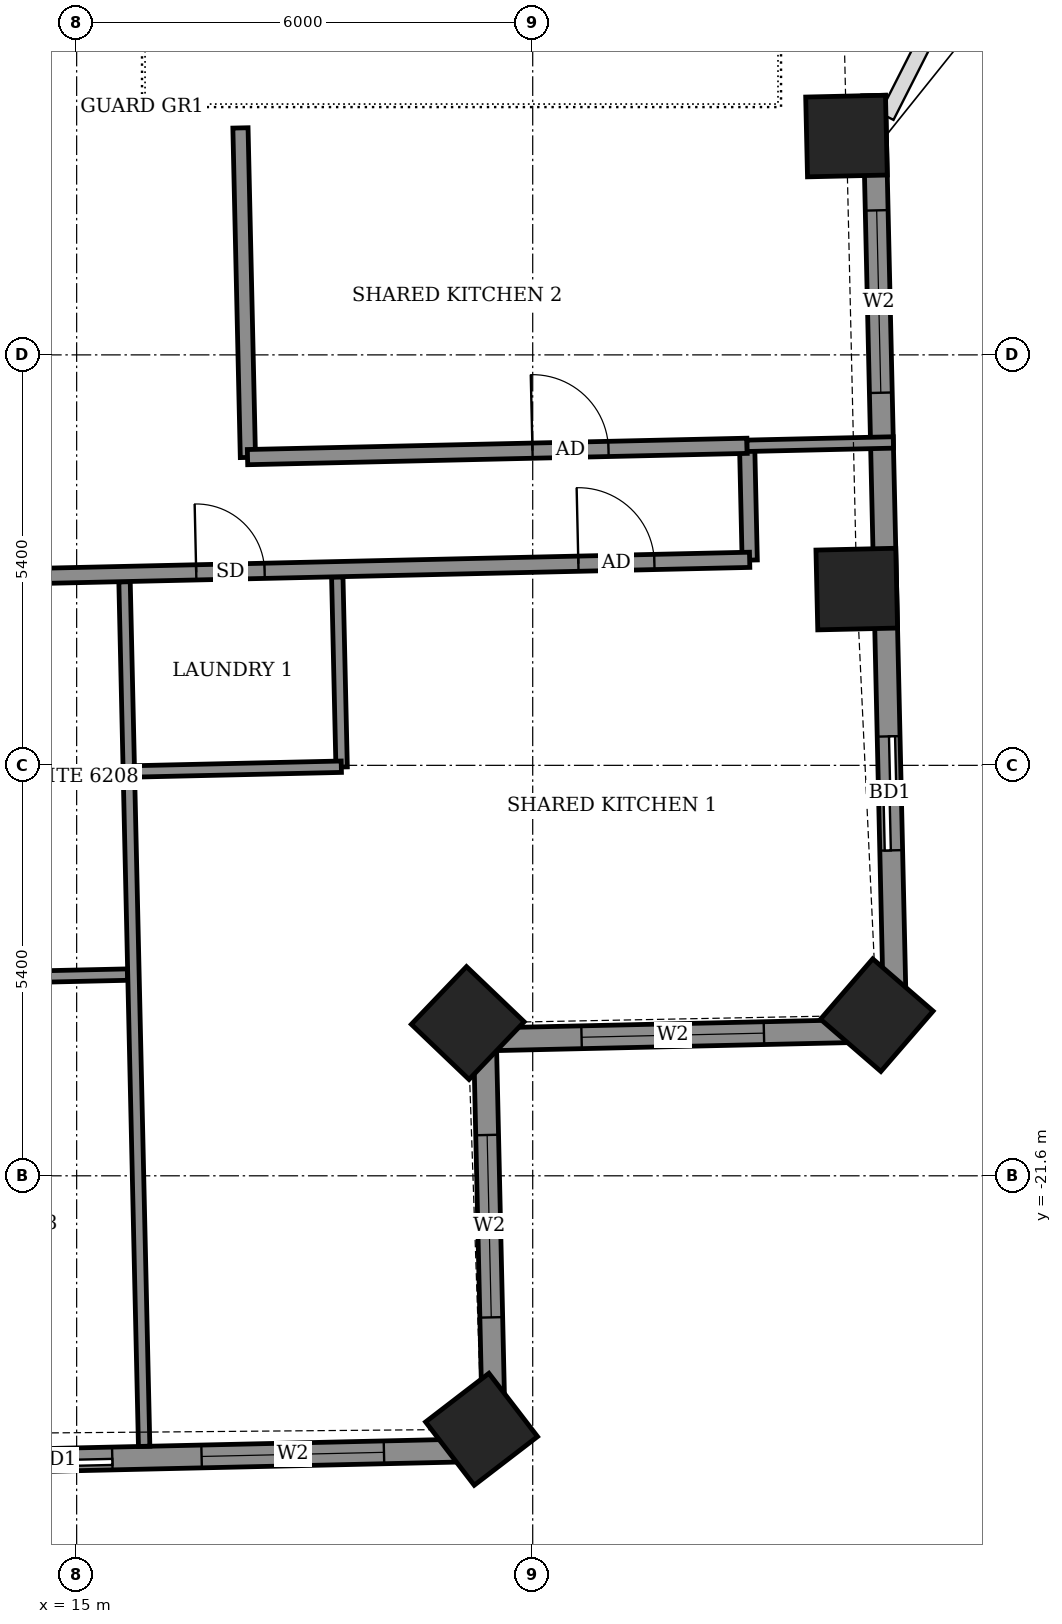
"""IFC4 building model, lengths in metres.
Left out: names, types, materials, properties, quantities, classifications, styles, units other than length and angle.
Written with IfcOpenShell. Run it as: python <this file> out.ifc"""

import sys

from ifc_helpers import new_model, si_unit, direction, frame, frame_2d, origin, origin_2d, place, context, subcontext, project, spatial, rectangle, extrude, element, fill, save


model = new_model("IFC4")
c1 = context("Model", 3, precision=1e-05, world=origin(), true_north=direction((0.0, 1.0)))
c2 = subcontext(c1, "Body", "Model", "MODEL_VIEW")
j1 = project(units=[si_unit("LENGTHUNIT", "METRE"), si_unit("PLANEANGLEUNIT", "RADIAN")], contexts=[c1])
p1 = place(None, origin())
s1 = spatial("IfcSite", under=j1, at=p1, CompositionType="ELEMENT")
p2 = place(p1, origin())
s2 = spatial("IfcBuilding", under=s1, at=p2, CompositionType="ELEMENT")
p3 = place(p2, frame((0.0, 0.0, 245.5)))
s3 = spatial("IfcBuildingStorey", under=s2, at=p3, CompositionType="ELEMENT", Elevation=245.5)
for number, where, z_axis, x_axis in (
    (1, (20.327, -24.935, -0.55), (0.0, 0.0, 1.0), (0.793, 0.609, 0.0)),
    (2, (20.146, -19.59, -0.55), (0.0, 0.0, 1.0), (0.691, 0.723, 0.0)),
    (3, (25.527, -19.487, -0.55), (0.0, 0.0, 1.0), (0.654, 0.756, 0.0)),
    (4, (25.263, -13.881, -0.55), (0.0, 0.0, 1.0), (-0.023, 1.0, 0.0)),
    (5, (25.128, -7.921, -0.55), (0.0, 0.0, 1.0), (-0.023, 1.0, 0.0)),
):
    element("IfcColumn", number, at=place(p3, frame(where, z_axis=z_axis, x_axis=x_axis)), inside=s3, PredefinedType="COLUMN", context=c2, shape_type="SweptSolid", body=[
        extrude(rectangle(XDim=1.05, YDim=1.05, at=origin_2d()), origin(), (0.0, 0.0, 1.0), 3.6),
    ])
p4 = place(p3, frame((25.77, -19.684, 0.0), z_axis=(0.0, 0.0, 1.0), x_axis=(-0.022688489476, 0.999742583091, 0.0)))
e6 = element("IfcWall", 6, at=p4, inside=s3, PredefinedType="SOLIDWALL", context=c2, shape_type="SweptSolid", body=[
    extrude(rectangle(XDim=12.299, YDim=0.3, at=frame_2d((6.15, 0.0))), origin(), (0.0, 0.0, 1.0), 2.55),
])
p5 = place(p4, frame((2.366, 0.0, 0.0)))
e7 = element("IfcOpeningElement", 7, at=p5, cuts=e6, PredefinedType="OPENING", context=c2, shape_type="SweptSolid", body=[
    extrude(rectangle(XDim=1.5, YDim=2.4, at=frame_2d((0.75, 1.2))), frame((0.0, 0.16, 0.0), z_axis=(0.0, -1.0, 0.0), x_axis=(1.0, 0.0, 0.0)), (0.0, 0.0, 1.0), 0.32),
])
p6 = place(p4, frame((8.388, 0.0, 0.9)))
e8 = element("IfcOpeningElement", 8, at=p6, cuts=e6, PredefinedType="OPENING", context=c2, shape_type="SweptSolid", body=[
    extrude(rectangle(XDim=2.4, YDim=1.5, at=frame_2d((1.2, 0.75))), frame((0.0, 0.16, 0.0), z_axis=(0.0, -1.0, 0.0), x_axis=(1.0, 0.0, 0.0)), (0.0, 0.0, 1.0), 0.32),
])
p7 = place(p3, frame((-23.403, -26.201, 0.0), z_axis=(0.0, 0.0, 1.0), x_axis=(0.999742770494, 0.022680230258, 0.0)))
e9 = element("IfcWall", 9, at=p7, inside=s3, PredefinedType="SOLIDWALL", context=c2, shape_type="SweptSolid", body=[
    extrude(rectangle(XDim=43.908, YDim=0.3, at=frame_2d((21.954, 0.0))), origin(), (0.0, 0.0, 1.0), 2.55),
])
p8 = place(p7, frame((1.951, 0.0, 0.0)))
e10 = element("IfcOpeningElement", 10, at=p8, cuts=e9, PredefinedType="OPENING", context=c2, shape_type="SweptSolid", body=[
    extrude(rectangle(XDim=1.5, YDim=2.4, at=frame_2d((0.75, 1.2))), frame((0.0, 0.16, 0.0), z_axis=(0.0, -1.0, 0.0), x_axis=(1.0, 0.0, 0.0)), (0.0, 0.0, 1.0), 0.32),
])
p9 = place(p7, frame((5.272, 0.0, 0.0)))
e11 = element("IfcOpeningElement", 11, at=p9, cuts=e9, PredefinedType="OPENING", context=c2, shape_type="SweptSolid", body=[
    extrude(rectangle(XDim=1.2, YDim=2.4, at=frame_2d((0.6, 1.2))), frame((0.0, 0.16, 0.0), z_axis=(0.0, -1.0, 0.0), x_axis=(1.0, 0.0, 0.0)), (0.0, 0.0, 1.0), 0.32),
])
p10 = place(p7, frame((10.475, 0.0, 0.0)))
e12 = element("IfcOpeningElement", 12, at=p10, cuts=e9, PredefinedType="OPENING", context=c2, shape_type="SweptSolid", body=[
    extrude(rectangle(XDim=1.5, YDim=2.4, at=frame_2d((0.75, 1.2))), frame((0.0, 0.16, 0.0), z_axis=(0.0, -1.0, 0.0), x_axis=(1.0, 0.0, 0.0)), (0.0, 0.0, 1.0), 0.32),
])
p11 = place(p7, frame((15.53, 0.0, 0.0)))
e13 = element("IfcOpeningElement", 13, at=p11, cuts=e9, PredefinedType="OPENING", context=c2, shape_type="SweptSolid", body=[
    extrude(rectangle(XDim=1.5, YDim=2.4, at=frame_2d((0.75, 1.2))), frame((0.0, 0.16, 0.0), z_axis=(0.0, -1.0, 0.0), x_axis=(1.0, 0.0, 0.0)), (0.0, 0.0, 1.0), 0.32),
])
p12 = place(p7, frame((18.939, 0.0, 0.0)))
e14 = element("IfcOpeningElement", 14, at=p12, cuts=e9, PredefinedType="OPENING", context=c2, shape_type="SweptSolid", body=[
    extrude(rectangle(XDim=1.5, YDim=2.4, at=frame_2d((0.75, 1.2))), frame((0.0, 0.16, 0.0), z_axis=(0.0, -1.0, 0.0), x_axis=(1.0, 0.0, 0.0)), (0.0, 0.0, 1.0), 0.32),
])
p13 = place(p7, frame((23.489, 0.0, 0.0)))
e15 = element("IfcOpeningElement", 15, at=p13, cuts=e9, PredefinedType="OPENING", context=c2, shape_type="SweptSolid", body=[
    extrude(rectangle(XDim=1.5, YDim=2.4, at=frame_2d((0.75, 1.2))), frame((0.0, 0.16, 0.0), z_axis=(0.0, -1.0, 0.0), x_axis=(1.0, 0.0, 0.0)), (0.0, 0.0, 1.0), 0.32),
])
p14 = place(p7, frame((26.898, 0.0, 0.0)))
e16 = element("IfcOpeningElement", 16, at=p14, cuts=e9, PredefinedType="OPENING", context=c2, shape_type="SweptSolid", body=[
    extrude(rectangle(XDim=1.5, YDim=2.4, at=frame_2d((0.75, 1.2))), frame((0.0, 0.16, 0.0), z_axis=(0.0, -1.0, 0.0), x_axis=(1.0, 0.0, 0.0)), (0.0, 0.0, 1.0), 0.32),
])
p15 = place(p7, frame((32.05, 0.0, 0.0)))
e17 = element("IfcOpeningElement", 17, at=p15, cuts=e9, PredefinedType="OPENING", context=c2, shape_type="SweptSolid", body=[
    extrude(rectangle(XDim=1.5, YDim=2.4, at=frame_2d((0.75, 1.2))), frame((0.0, 0.16, 0.0), z_axis=(0.0, -1.0, 0.0), x_axis=(1.0, 0.0, 0.0)), (0.0, 0.0, 1.0), 0.32),
])
p16 = place(p7, frame((37.382, 0.0, 0.0)))
e18 = element("IfcOpeningElement", 18, at=p16, cuts=e9, PredefinedType="OPENING", context=c2, shape_type="SweptSolid", body=[
    extrude(rectangle(XDim=1.5, YDim=2.4, at=frame_2d((0.75, 1.2))), frame((0.0, 0.16, 0.0), z_axis=(0.0, -1.0, 0.0), x_axis=(1.0, 0.0, 0.0)), (0.0, 0.0, 1.0), 0.32),
])
p17 = place(p7, frame((40.057, 0.0, 0.9)))
e19 = element("IfcOpeningElement", 19, at=p17, cuts=e9, PredefinedType="OPENING", context=c2, shape_type="SweptSolid", body=[
    extrude(rectangle(XDim=2.4, YDim=1.5, at=frame_2d((1.2, 0.75))), frame((0.0, 0.16, 0.0), z_axis=(0.0, -1.0, 0.0), x_axis=(1.0, 0.0, 0.0)), (0.0, 0.0, 1.0), 0.32),
])
p18 = place(p3, frame((20.494, -25.205, 0.0), z_axis=(0.0, 0.0, 1.0), x_axis=(-0.022558128916, 0.999745533033, 0.0)))
e20 = element("IfcWall", 20, at=p18, inside=s3, PredefinedType="SOLIDWALL", context=c2, shape_type="SweptSolid", body=[
    extrude(rectangle(XDim=5.401, YDim=0.3, at=frame_2d((2.7, 0.0))), origin(), (0.0, 0.0, 1.0), 2.55),
])
p19 = place(p18, frame((1.743, 0.0, 0.9)))
e21 = element("IfcOpeningElement", 21, at=p19, cuts=e20, PredefinedType="OPENING", context=c2, shape_type="SweptSolid", body=[
    extrude(rectangle(XDim=2.4, YDim=1.5, at=frame_2d((1.2, 0.75))), frame((0.0, 0.16, 0.0), z_axis=(0.0, -1.0, 0.0), x_axis=(1.0, 0.0, 0.0)), (0.0, 0.0, 1.0), 0.32),
])
p20 = place(p3, frame((20.372, -19.806, 0.0), z_axis=(0.0, 0.0, 1.0), x_axis=(0.999745417973, 0.02256322766, 0.0)))
e22 = element("IfcWall", 22, at=p20, inside=s3, PredefinedType="SOLIDWALL", context=c2, shape_type="SweptSolid", body=[
    extrude(rectangle(XDim=5.399, YDim=0.3, at=frame_2d((2.7, 0.0))), origin(), (0.0, 0.0, 1.0), 2.55),
])
p21 = place(p20, frame((1.271, 0.0, 0.9)))
e23 = element("IfcOpeningElement", 23, at=p21, cuts=e22, PredefinedType="OPENING", context=c2, shape_type="SweptSolid", body=[
    extrude(rectangle(XDim=2.4, YDim=1.5, at=frame_2d((1.2, 0.75))), frame((0.0, 0.16, 0.0), z_axis=(0.0, -1.0, 0.0), x_axis=(1.0, 0.0, 0.0)), (0.0, 0.0, 1.0), 0.32),
])
p22 = place(p3, frame((15.888, -25.159, 0.0), z_axis=(0.0, 0.0, 1.0), x_axis=(-0.022684355347, 0.999742676904, 0.0)))
e24 = element("IfcWall", 24, at=p22, inside=s3, PredefinedType="PARTITIONING", context=c2, shape_type="SweptSolid", body=[
    extrude(rectangle(XDim=11.376, YDim=0.15, at=frame_2d((5.688, 0.0))), origin(), (0.0, 0.0, 1.0), 2.55),
])
p23 = place(p3, frame((13.344, -19.005, 0.0), z_axis=(0.0, 0.0, 1.0), x_axis=(0.999749744571, 0.022370700241, 0.0)))
e25 = element("IfcWall", 25, at=p23, inside=s3, PredefinedType="PARTITIONING", context=c2, shape_type="SweptSolid", body=[
    extrude(rectangle(XDim=2.324, YDim=0.15, at=frame_2d((1.162, 0.0))), origin(), (0.0, 0.0, 1.0), 3.05),
])
p24 = place(p3, frame((18.486, -16.222, 0.0), z_axis=(0.0, 0.0, 1.0), x_axis=(-0.022854521249, 0.999738801317, 0.0)))
e26 = element("IfcWall", 26, at=p24, inside=s3, PredefinedType="PARTITIONING", context=c2, shape_type="SweptSolid", body=[
    extrude(rectangle(XDim=2.5, YDim=0.15, at=frame_2d((1.25, 0.0))), origin(), (0.0, 0.0, 1.0), 3.05),
])
p25 = place(p3, frame((15.757, -16.28, 0.0), z_axis=(0.0, 0.0, 1.0), x_axis=(0.99974114142, 0.022751926344, 0.0)))
e27 = element("IfcWall", 27, at=p25, inside=s3, PredefinedType="PARTITIONING", context=c2, shape_type="SweptSolid", body=[
    extrude(rectangle(XDim=2.726, YDim=0.15, at=frame_2d((1.363, 0.0))), origin(), (0.0, 0.0, 1.0), 3.05),
])
p26 = place(p3, frame((23.855, -13.5, 0.0), z_axis=(0.0, 0.0, 1.0), x_axis=(-0.022617910375, 0.999744182344, 0.0)))
e28 = element("IfcWall", 28, at=p26, inside=s3, PredefinedType="PARTITIONING", context=c2, shape_type="SweptSolid", body=[
    extrude(rectangle(XDim=1.5, YDim=0.2, at=frame_2d((0.75, 0.0))), origin(), (0.0, 0.0, 1.0), 3.05),
])
p27 = place(p3, frame((-27.016, -14.65, 0.0), z_axis=(0.0, 0.0, 1.0), x_axis=(0.999742874861, 0.022675629315, 0.0)))
e29 = element("IfcWall", 29, at=p27, inside=s3, PredefinedType="PARTITIONING", context=c2, shape_type="SweptSolid", body=[
    extrude(rectangle(XDim=50.883, YDim=0.2, at=frame_2d((25.442, 0.0))), origin(), (0.0, 0.0, 1.0), 3.05),
])
p28 = place(p27, frame((1.575, 0.0, 0.0)))
e30 = element("IfcOpeningElement", 30, at=p28, cuts=e29, PredefinedType="OPENING", context=c2, shape_type="SweptSolid", body=[
    extrude(rectangle(XDim=1.0, YDim=2.1, at=frame_2d((0.5, 1.05))), frame((0.0, 0.11, 0.0), z_axis=(0.0, -1.0, 0.0), x_axis=(1.0, 0.0, 0.0)), (0.0, 0.0, 1.0), 0.22),
])
p29 = place(p27, frame((6.4, 0.0, 0.0)))
e31 = element("IfcOpeningElement", 31, at=p29, cuts=e29, PredefinedType="OPENING", context=c2, shape_type="SweptSolid", body=[
    extrude(rectangle(XDim=0.9, YDim=2.1, at=frame_2d((0.45, 1.05))), frame((0.0, 0.11, 0.0), z_axis=(0.0, -1.0, 0.0), x_axis=(1.0, 0.0, 0.0)), (0.0, 0.0, 1.0), 0.22),
])
p30 = place(p27, frame((11.025, 0.0, 0.0)))
e32 = element("IfcOpeningElement", 32, at=p30, cuts=e29, PredefinedType="OPENING", context=c2, shape_type="SweptSolid", body=[
    extrude(rectangle(XDim=0.9, YDim=2.1, at=frame_2d((0.45, 1.05))), frame((0.0, 0.11, 0.0), z_axis=(0.0, -1.0, 0.0), x_axis=(1.0, 0.0, 0.0)), (0.0, 0.0, 1.0), 0.22),
])
p31 = place(p27, frame((12.925, 0.0, 0.0)))
e33 = element("IfcOpeningElement", 33, at=p31, cuts=e29, PredefinedType="OPENING", context=c2, shape_type="SweptSolid", body=[
    extrude(rectangle(XDim=0.9, YDim=2.1, at=frame_2d((0.45, 1.05))), frame((0.0, 0.11, 0.0), z_axis=(0.0, -1.0, 0.0), x_axis=(1.0, 0.0, 0.0)), (0.0, 0.0, 1.0), 0.22),
])
p32 = place(p27, frame((19.65, 0.0, 0.0)))
e34 = element("IfcOpeningElement", 34, at=p32, cuts=e29, PredefinedType="OPENING", context=c2, shape_type="SweptSolid", body=[
    extrude(rectangle(XDim=0.9, YDim=2.1, at=frame_2d((0.45, 1.05))), frame((0.0, 0.11, 0.0), z_axis=(0.0, -1.0, 0.0), x_axis=(1.0, 0.0, 0.0)), (0.0, 0.0, 1.0), 0.22),
])
p33 = place(p27, frame((21.575, 0.0, 0.0)))
e35 = element("IfcOpeningElement", 35, at=p33, cuts=e29, PredefinedType="OPENING", context=c2, shape_type="SweptSolid", body=[
    extrude(rectangle(XDim=0.9, YDim=2.1, at=frame_2d((0.45, 1.05))), frame((0.0, 0.11, 0.0), z_axis=(0.0, -1.0, 0.0), x_axis=(1.0, 0.0, 0.0)), (0.0, 0.0, 1.0), 0.22),
])
p34 = place(p27, frame((28.25, 0.0, 0.0)))
e36 = element("IfcOpeningElement", 36, at=p34, cuts=e29, PredefinedType="OPENING", context=c2, shape_type="SweptSolid", body=[
    extrude(rectangle(XDim=0.9, YDim=2.1, at=frame_2d((0.45, 1.05))), frame((0.0, 0.11, 0.0), z_axis=(0.0, -1.0, 0.0), x_axis=(1.0, 0.0, 0.0)), (0.0, 0.0, 1.0), 0.22),
])
p35 = place(p27, frame((30.125, 0.0, 0.0)))
e37 = element("IfcOpeningElement", 37, at=p35, cuts=e29, PredefinedType="OPENING", context=c2, shape_type="SweptSolid", body=[
    extrude(rectangle(XDim=0.9, YDim=2.1, at=frame_2d((0.45, 1.05))), frame((0.0, 0.11, 0.0), z_axis=(0.0, -1.0, 0.0), x_axis=(1.0, 0.0, 0.0)), (0.0, 0.0, 1.0), 0.22),
])
p36 = place(p27, frame((36.9, 0.0, 0.0)))
e38 = element("IfcOpeningElement", 38, at=p36, cuts=e29, PredefinedType="OPENING", context=c2, shape_type="SweptSolid", body=[
    extrude(rectangle(XDim=0.9, YDim=2.1, at=frame_2d((0.45, 1.05))), frame((0.0, 0.11, 0.0), z_axis=(0.0, -1.0, 0.0), x_axis=(1.0, 0.0, 0.0)), (0.0, 0.0, 1.0), 0.22),
])
p37 = place(p27, frame((38.85, 0.0, 0.0)))
e39 = element("IfcOpeningElement", 39, at=p37, cuts=e29, PredefinedType="OPENING", context=c2, shape_type="SweptSolid", body=[
    extrude(rectangle(XDim=0.9, YDim=2.1, at=frame_2d((0.45, 1.05))), frame((0.0, 0.11, 0.0), z_axis=(0.0, -1.0, 0.0), x_axis=(1.0, 0.0, 0.0)), (0.0, 0.0, 1.0), 0.22),
])
p38 = place(p27, frame((48.629, 0.0, 0.0)))
e40 = element("IfcOpeningElement", 40, at=p38, cuts=e29, PredefinedType="OPENING", context=c2, shape_type="SweptSolid", body=[
    extrude(rectangle(XDim=1.0, YDim=2.1, at=frame_2d((0.5, 1.05))), frame((0.0, 0.11, 0.0), z_axis=(0.0, -1.0, 0.0), x_axis=(1.0, 0.0, 0.0)), (0.0, 0.0, 1.0), 0.22),
])
p39 = place(p27, frame((43.6, 0.0, 0.0)))
e41 = element("IfcOpeningElement", 41, at=p39, cuts=e29, PredefinedType="OPENING", context=c2, shape_type="SweptSolid", body=[
    extrude(rectangle(XDim=0.9, YDim=2.1, at=frame_2d((0.45, 1.05))), frame((0.0, 0.11, 0.0), z_axis=(0.0, -1.0, 0.0), x_axis=(1.0, 0.0, 0.0)), (0.0, 0.0, 1.0), 0.22),
])
p40 = place(p3, frame((17.253, -12.149, 0.0), z_axis=(0.0, 0.0, 1.0), x_axis=(-0.022578158225, 0.999745080894, 0.0)))
e42 = element("IfcWall", 42, at=p40, inside=s3, PredefinedType="PARTITIONING", context=c2, shape_type="SweptSolid", body=[
    extrude(rectangle(XDim=4.336, YDim=0.2, at=frame_2d((2.168, 0.0))), origin(), (0.0, 0.0, 1.0), 3.05),
])
p41 = place(p3, frame((17.248, -12.145, 0.0), z_axis=(0.0, 0.0, 1.0), x_axis=(0.999743348025, 0.022654758434, 0.0)))
e43 = element("IfcWall", 43, at=p41, inside=s3, PredefinedType="PARTITIONING", context=c2, shape_type="SweptSolid", body=[
    extrude(rectangle(XDim=6.574, YDim=0.2, at=frame_2d((3.287, 0.0))), origin(), (0.0, 0.0, 1.0), 3.05),
])
p42 = place(p41, frame((3.75, 0.0, 0.0)))
e44 = element("IfcOpeningElement", 44, at=p42, cuts=e43, PredefinedType="OPENING", context=c2, shape_type="SweptSolid", body=[
    extrude(rectangle(XDim=1.0, YDim=2.1, at=frame_2d((0.5, 1.05))), frame((0.0, 0.11, 0.0), z_axis=(0.0, -1.0, 0.0), x_axis=(1.0, 0.0, 0.0)), (0.0, 0.0, 1.0), 0.22),
])
p43 = place(p3, frame((23.82, -11.996, 0.0), z_axis=(0.0, 0.0, 1.0), x_axis=(0.999736638572, 0.02294893235, 0.0)))
e45 = element("IfcWall", 45, at=p43, inside=s3, PredefinedType="PARTITIONING", context=c2, shape_type="SweptSolid", body=[
    extrude(rectangle(XDim=1.926, YDim=0.15, at=frame_2d((0.963, 0.0))), origin(), (0.0, 0.0, 1.0), 2.55),
])
p44 = place(p5, origin())
e46 = element("IfcDoor", 46, at=p44, inside=s3, OperationType="SLIDING_TO_LEFT", PredefinedType="DOOR", context=c2, shape_type="SweptSolid", body=[
    extrude(rectangle(XDim=1.5, YDim=2.4, at=frame_2d((0.75, 1.2))), frame((0.0, 0.025, 0.0), z_axis=(0.0, -1.0, 0.0), x_axis=(1.0, 0.0, 0.0)), (0.0, 0.0, 1.0), 0.05),
])
fill(e7, e46)
p45 = place(p6, origin())
e47 = element("IfcWindow", 47, at=p45, inside=s3, PartitioningType="DOUBLE_PANEL_VERTICAL", PredefinedType="WINDOW", context=c2, shape_type="SweptSolid", body=[
    extrude(rectangle(XDim=2.4, YDim=1.5, at=frame_2d((1.2, 0.75))), frame((0.0, 0.03, 0.0), z_axis=(0.0, -1.0, 0.0), x_axis=(1.0, 0.0, 0.0)), (0.0, 0.0, 1.0), 0.06),
])
fill(e8, e47)
p46 = place(p16, origin())
e48 = element("IfcDoor", 48, at=p46, inside=s3, OperationType="SLIDING_TO_LEFT", PredefinedType="DOOR", context=c2, shape_type="SweptSolid", body=[
    extrude(rectangle(XDim=1.5, YDim=2.4, at=frame_2d((0.75, 1.2))), frame((0.0, 0.025, 0.0), z_axis=(0.0, -1.0, 0.0), x_axis=(1.0, 0.0, 0.0)), (0.0, 0.0, 1.0), 0.05),
])
fill(e18, e48)
p47 = place(p17, origin())
e49 = element("IfcWindow", 49, at=p47, inside=s3, PartitioningType="DOUBLE_PANEL_VERTICAL", PredefinedType="WINDOW", context=c2, shape_type="SweptSolid", body=[
    extrude(rectangle(XDim=2.4, YDim=1.5, at=frame_2d((1.2, 0.75))), frame((0.0, 0.03, 0.0), z_axis=(0.0, -1.0, 0.0), x_axis=(1.0, 0.0, 0.0)), (0.0, 0.0, 1.0), 0.06),
])
fill(e19, e49)
p48 = place(p19, origin())
e50 = element("IfcWindow", 50, at=p48, inside=s3, PartitioningType="DOUBLE_PANEL_VERTICAL", PredefinedType="WINDOW", context=c2, shape_type="SweptSolid", body=[
    extrude(rectangle(XDim=2.4, YDim=1.5, at=frame_2d((1.2, 0.75))), frame((0.0, 0.03, 0.0), z_axis=(0.0, -1.0, 0.0), x_axis=(1.0, 0.0, 0.0)), (0.0, 0.0, 1.0), 0.06),
])
fill(e21, e50)
p49 = place(p21, origin())
e51 = element("IfcWindow", 51, at=p49, inside=s3, PartitioningType="DOUBLE_PANEL_VERTICAL", PredefinedType="WINDOW", context=c2, shape_type="SweptSolid", body=[
    extrude(rectangle(XDim=2.4, YDim=1.5, at=frame_2d((1.2, 0.75))), frame((0.0, 0.03, 0.0), z_axis=(0.0, -1.0, 0.0), x_axis=(1.0, 0.0, 0.0)), (0.0, 0.0, 1.0), 0.06),
])
fill(e23, e51)
p50 = place(p38, origin())
e52 = element("IfcDoor", 52, at=p50, inside=s3, OperationType="SINGLE_SWING_RIGHT", PredefinedType="DOOR", context=c2, shape_type="SweptSolid", body=[
    extrude(rectangle(XDim=1.0, YDim=2.1, at=frame_2d((0.5, 1.05))), frame((0.0, 0.025, 0.0), z_axis=(0.0, -1.0, 0.0), x_axis=(1.0, 0.0, 0.0)), (0.0, 0.0, 1.0), 0.05),
])
fill(e40, e52)
p51 = place(p39, origin())
e53 = element("IfcDoor", 53, at=p51, inside=s3, OperationType="SINGLE_SWING_RIGHT", PredefinedType="DOOR", context=c2, shape_type="SweptSolid", body=[
    extrude(rectangle(XDim=0.9, YDim=2.1, at=frame_2d((0.45, 1.05))), frame((0.0, 0.025, 0.0), z_axis=(0.0, -1.0, 0.0), x_axis=(1.0, 0.0, 0.0)), (0.0, 0.0, 1.0), 0.05),
])
fill(e41, e53)
p52 = place(p42, origin())
e54 = element("IfcDoor", 54, at=p52, inside=s3, OperationType="SINGLE_SWING_LEFT", PredefinedType="DOOR", context=c2, shape_type="SweptSolid", body=[
    extrude(rectangle(XDim=1.0, YDim=2.1, at=frame_2d((0.5, 1.05))), frame((0.0, 0.025, 0.0), z_axis=(0.0, -1.0, 0.0), x_axis=(1.0, 0.0, 0.0)), (0.0, 0.0, 1.0), 0.05),
])
fill(e44, e54)
save(model, sys.argv[1])
